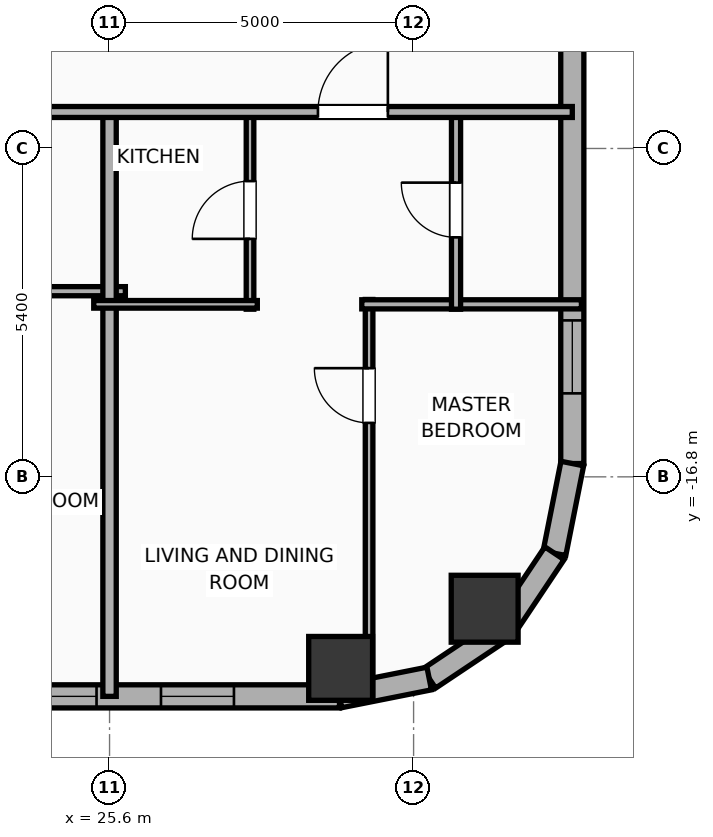
"""IFC4 building model, lengths in metres.
Left out: names, types, materials, properties, quantities, classifications, styles, units other than length and angle.
Written with IfcOpenShell. Run it as: python <this file> out.ifc"""

import sys

from ifc_helpers import new_model, si_unit, direction, frame, frame_2d, origin, origin_2d, place, context, subcontext, project, spatial, rectangle, hollow_rectangle, hollow_circle, extrude, element, fill, save


model = new_model("IFC4")
c1 = context("Model", 3, precision=1e-05, world=origin(), true_north=direction((0.0, 1.0)))
c2 = subcontext(c1, "Body", "Model", "MODEL_VIEW")
j1 = project(units=[si_unit("LENGTHUNIT", "METRE"), si_unit("PLANEANGLEUNIT", "RADIAN")], contexts=[c1])
p1 = place(None, origin())
s1 = spatial("IfcSite", under=j1, at=p1, CompositionType="ELEMENT")
p2 = place(p1, origin())
s2 = spatial("IfcBuilding", under=s1, at=p2, CompositionType="ELEMENT")
p3 = place(p2, frame((0.0, 0.0, 132.6)))
s3 = spatial("IfcBuildingStorey", under=s2, at=p3, CompositionType="ELEMENT", Elevation=132.6)
p4 = place(p3, frame((29.4, -19.95, 0.0), z_axis=(0.0, 0.0, 1.0), x_axis=(1.0, 0.0, 0.0)))
e1 = element("IfcColumn", 1, at=p4, inside=s3, PredefinedType="COLUMN", context=c2, shape_type="SweptSolid", body=[
    extrude(hollow_rectangle(XDim=1.05, YDim=1.05, WallThickness=0.036, at=origin_2d()), origin(), (0.0, 0.0, 1.0), 3.9),
])
p5 = place(p3, frame((31.769, -18.969, 0.0), z_axis=(0.0, 0.0, 1.0), x_axis=(1.0, 0.0, 0.0)))
e2 = element("IfcColumn", 2, at=p5, inside=s3, PredefinedType="COLUMN", context=c2, shape_type="SweptSolid", body=[
    extrude(hollow_circle(Radius=0.55, WallThickness=0.036, at=origin_2d()), origin(), (0.0, 0.0, 1.0), 3.9),
])
p6 = place(p3, frame((29.381, -20.41, 0.0), z_axis=(0.0, 0.0, 1.0), x_axis=(-1.0, 0.0, 0.0)))
e3 = element("IfcWall", 3, at=p6, inside=s3, PredefinedType="ELEMENTEDWALL", context=c2, shape_type="SweptSolid", body=[
    extrude(rectangle(XDim=54.763, YDim=0.38, at=frame_2d((27.381, 0.0))), origin(), (0.0, 0.0, 1.0), 3.65),
])
p7 = place(p6, frame((3.995, 0.0, 0.75)))
e4 = element("IfcOpeningElement", 4, at=p7, cuts=e3, PredefinedType="OPENING", context=c2, shape_type="SweptSolid", body=[
    extrude(rectangle(XDim=2.4, YDim=2.1, at=frame_2d((1.2, 1.05))), frame((0.0, 0.2, 0.0), z_axis=(0.0, -1.0, 0.0), x_axis=(1.0, 0.0, 0.0)), (0.0, 0.0, 1.0), 0.4),
])
p8 = place(p6, frame((18.486, 0.0, 0.75)))
e5 = element("IfcOpeningElement", 5, at=p8, cuts=e3, PredefinedType="OPENING", context=c2, shape_type="SweptSolid", body=[
    extrude(rectangle(XDim=2.4, YDim=2.1, at=frame_2d((1.2, 1.05))), frame((0.0, 0.2, 0.0), z_axis=(0.0, -1.0, 0.0), x_axis=(1.0, 0.0, 0.0)), (0.0, 0.0, 1.0), 0.4),
])
p9 = place(p6, frame((46.717, 0.0, 0.75)))
e6 = element("IfcOpeningElement", 6, at=p9, cuts=e3, PredefinedType="OPENING", context=c2, shape_type="SweptSolid", body=[
    extrude(rectangle(XDim=2.4, YDim=2.1, at=frame_2d((1.2, 1.05))), frame((0.0, 0.2, 0.0), z_axis=(0.0, -1.0, 0.0), x_axis=(1.0, 0.0, 0.0)), (0.0, 0.0, 1.0), 0.4),
])
p10 = place(p6, frame((52.651, 0.0, 0.75)))
e7 = element("IfcOpeningElement", 7, at=p10, cuts=e3, PredefinedType="OPENING", context=c2, shape_type="SweptSolid", body=[
    extrude(rectangle(XDim=1.2, YDim=2.05, at=frame_2d((0.6, 1.025))), frame((0.0, 0.2, 0.0), z_axis=(0.0, -1.0, 0.0), x_axis=(1.0, 0.0, 0.0)), (0.0, 0.0, 1.0), 0.4),
])
p11 = place(p6, frame((50.521, 0.0, 0.75)))
e8 = element("IfcOpeningElement", 8, at=p11, cuts=e3, PredefinedType="OPENING", context=c2, shape_type="SweptSolid", body=[
    extrude(rectangle(XDim=1.2, YDim=2.05, at=frame_2d((0.6, 1.025))), frame((0.0, 0.2, 0.0), z_axis=(0.0, -1.0, 0.0), x_axis=(1.0, 0.0, 0.0)), (0.0, 0.0, 1.0), 0.4),
])
p12 = place(p6, frame((40.191, 0.0, 0.75)))
e9 = element("IfcOpeningElement", 9, at=p12, cuts=e3, PredefinedType="OPENING", context=c2, shape_type="SweptSolid", body=[
    extrude(rectangle(XDim=1.2, YDim=2.05, at=frame_2d((0.6, 1.025))), frame((0.0, 0.2, 0.0), z_axis=(0.0, -1.0, 0.0), x_axis=(1.0, 0.0, 0.0)), (0.0, 0.0, 1.0), 0.4),
])
p13 = place(p6, frame((44.631, 0.0, 0.75)))
e10 = element("IfcOpeningElement", 10, at=p13, cuts=e3, PredefinedType="OPENING", context=c2, shape_type="SweptSolid", body=[
    extrude(rectangle(XDim=1.2, YDim=2.05, at=frame_2d((0.6, 1.025))), frame((0.0, 0.2, 0.0), z_axis=(0.0, -1.0, 0.0), x_axis=(1.0, 0.0, 0.0)), (0.0, 0.0, 1.0), 0.4),
])
p14 = place(p6, frame((36.561, 0.0, 0.75)))
e11 = element("IfcOpeningElement", 11, at=p14, cuts=e3, PredefinedType="OPENING", context=c2, shape_type="SweptSolid", body=[
    extrude(rectangle(XDim=1.2, YDim=2.05, at=frame_2d((0.6, 1.025))), frame((0.0, 0.2, 0.0), z_axis=(0.0, -1.0, 0.0), x_axis=(1.0, 0.0, 0.0)), (0.0, 0.0, 1.0), 0.4),
])
p15 = place(p6, frame((30.004, 0.0, 0.75)))
e12 = element("IfcOpeningElement", 12, at=p15, cuts=e3, PredefinedType="OPENING", context=c2, shape_type="SweptSolid", body=[
    extrude(rectangle(XDim=1.2, YDim=2.05, at=frame_2d((0.6, 1.025))), frame((0.0, 0.2, 0.0), z_axis=(0.0, -1.0, 0.0), x_axis=(1.0, 0.0, 0.0)), (0.0, 0.0, 1.0), 0.4),
])
p16 = place(p6, frame((33.599, 0.0, 0.75)))
e13 = element("IfcOpeningElement", 13, at=p16, cuts=e3, PredefinedType="OPENING", context=c2, shape_type="SweptSolid", body=[
    extrude(rectangle(XDim=1.2, YDim=2.05, at=frame_2d((0.6, 1.025))), frame((0.0, 0.2, 0.0), z_axis=(0.0, -1.0, 0.0), x_axis=(1.0, 0.0, 0.0)), (0.0, 0.0, 1.0), 0.4),
])
p17 = place(p6, frame((26.086, 0.0, 0.75)))
e14 = element("IfcOpeningElement", 14, at=p17, cuts=e3, PredefinedType="OPENING", context=c2, shape_type="SweptSolid", body=[
    extrude(rectangle(XDim=1.2, YDim=2.05, at=frame_2d((0.6, 1.025))), frame((0.0, 0.2, 0.0), z_axis=(0.0, -1.0, 0.0), x_axis=(1.0, 0.0, 0.0)), (0.0, 0.0, 1.0), 0.4),
])
p18 = place(p6, frame((22.626, 0.0, 0.75)))
e15 = element("IfcOpeningElement", 15, at=p18, cuts=e3, PredefinedType="OPENING", context=c2, shape_type="SweptSolid", body=[
    extrude(rectangle(XDim=1.2, YDim=2.05, at=frame_2d((0.6, 1.025))), frame((0.0, 0.2, 0.0), z_axis=(0.0, -1.0, 0.0), x_axis=(1.0, 0.0, 0.0)), (0.0, 0.0, 1.0), 0.4),
])
p19 = place(p6, frame((15.361, 0.0, 0.75)))
e16 = element("IfcOpeningElement", 16, at=p19, cuts=e3, PredefinedType="OPENING", context=c2, shape_type="SweptSolid", body=[
    extrude(rectangle(XDim=1.2, YDim=2.05, at=frame_2d((0.6, 1.025))), frame((0.0, 0.2, 0.0), z_axis=(0.0, -1.0, 0.0), x_axis=(1.0, 0.0, 0.0)), (0.0, 0.0, 1.0), 0.4),
])
p20 = place(p6, frame((8.986, 0.0, 0.75)))
e17 = element("IfcOpeningElement", 17, at=p20, cuts=e3, PredefinedType="OPENING", context=c2, shape_type="SweptSolid", body=[
    extrude(rectangle(XDim=1.2, YDim=2.05, at=frame_2d((0.6, 1.025))), frame((0.0, 0.2, 0.0), z_axis=(0.0, -1.0, 0.0), x_axis=(1.0, 0.0, 0.0)), (0.0, 0.0, 1.0), 0.4),
])
p21 = place(p6, frame((1.736, 0.0, 0.75)))
e18 = element("IfcOpeningElement", 18, at=p21, cuts=e3, PredefinedType="OPENING", context=c2, shape_type="SweptSolid", body=[
    extrude(rectangle(XDim=1.2, YDim=2.05, at=frame_2d((0.6, 1.025))), frame((0.0, 0.2, 0.0), z_axis=(0.0, -1.0, 0.0), x_axis=(1.0, 0.0, 0.0)), (0.0, 0.0, 1.0), 0.4),
])
p22 = place(p3, frame((33.21, 17.781, 0.0), z_axis=(0.0, 0.0, 1.0), x_axis=(0.0, -1.0, 0.0)))
e19 = element("IfcWall", 19, at=p22, inside=s3, PredefinedType="ELEMENTEDWALL", context=c2, shape_type="SweptSolid", body=[
    extrude(rectangle(XDim=34.363, YDim=0.38, at=frame_2d((17.181, 0.0))), origin(), (0.0, 0.0, 1.0), 3.65),
])
p23 = place(p22, frame((32.008, 0.0, 0.75)))
e20 = element("IfcOpeningElement", 20, at=p23, cuts=e19, PredefinedType="OPENING", context=c2, shape_type="SweptSolid", body=[
    extrude(rectangle(XDim=1.2, YDim=2.05, at=frame_2d((0.6, 1.025))), frame((0.0, 0.2, 0.0), z_axis=(0.0, -1.0, 0.0), x_axis=(1.0, 0.0, 0.0)), (0.0, 0.0, 1.0), 0.4),
])
p24 = place(p22, frame((12.486, 0.0, 0.75)))
e21 = element("IfcOpeningElement", 21, at=p24, cuts=e19, PredefinedType="OPENING", context=c2, shape_type="SweptSolid", body=[
    extrude(rectangle(XDim=1.2, YDim=2.05, at=frame_2d((0.6, 1.025))), frame((0.0, 0.2, 0.0), z_axis=(0.0, -1.0, 0.0), x_axis=(1.0, 0.0, 0.0)), (0.0, 0.0, 1.0), 0.4),
])
p25 = place(p22, frame((21.736, 0.0, 0.75)))
e22 = element("IfcOpeningElement", 22, at=p25, cuts=e19, PredefinedType="OPENING", context=c2, shape_type="SweptSolid", body=[
    extrude(rectangle(XDim=1.2, YDim=2.05, at=frame_2d((0.6, 1.025))), frame((0.0, 0.2, 0.0), z_axis=(0.0, -1.0, 0.0), x_axis=(1.0, 0.0, 0.0)), (0.0, 0.0, 1.0), 0.4),
])
p26 = place(p3, frame((33.21, -16.581, 0.0), z_axis=(0.0, 0.0, 1.0), x_axis=(-0.195086038585, -0.980786132421, 0.0)))
e23 = element("IfcWall", 23, at=p26, inside=s3, PredefinedType="ELEMENTEDWALL", context=c2, shape_type="SweptSolid", body=[
    extrude(rectangle(XDim=1.504, YDim=0.38, at=frame_2d((0.752, 0.0))), origin(), (0.0, 0.0, 1.0), 3.65),
])
p27 = place(p3, frame((32.917, -18.057, 0.0), z_axis=(0.0, 0.0, 1.0), x_axis=(-0.555610286119, -0.831442848281, 0.0)))
e24 = element("IfcWall", 24, at=p27, inside=s3, PredefinedType="ELEMENTEDWALL", context=c2, shape_type="SweptSolid", body=[
    extrude(rectangle(XDim=1.485, YDim=0.38, at=frame_2d((0.743, 0.0))), origin(), (0.0, 0.0, 1.0), 3.65),
])
p28 = place(p3, frame((32.091, -19.292, 0.0), z_axis=(0.0, 0.0, 1.0), x_axis=(-0.831468045563, -0.555572577804, 0.0)))
e25 = element("IfcWall", 25, at=p28, inside=s3, PredefinedType="ELEMENTEDWALL", context=c2, shape_type="SweptSolid", body=[
    extrude(rectangle(XDim=1.485, YDim=0.38, at=frame_2d((0.742, 0.0))), origin(), (0.0, 0.0, 1.0), 3.65),
])
p29 = place(p3, frame((30.857, -20.116, 0.0), z_axis=(0.0, 0.0, 1.0), x_axis=(-0.980786132421, -0.195086038585, 0.0)))
e26 = element("IfcWall", 26, at=p29, inside=s3, PredefinedType="ELEMENTEDWALL", context=c2, shape_type="SweptSolid", body=[
    extrude(rectangle(XDim=1.504, YDim=0.38, at=frame_2d((0.752, 0.0))), origin(), (0.0, 0.0, 1.0), 3.65),
])
p30 = place(p3, frame((22.07, -13.747, 0.0), z_axis=(0.0, 0.0, 1.0), x_axis=(1.0, 0.0, 0.0)))
e27 = element("IfcWall", 27, at=p30, inside=s3, PredefinedType="PLUMBINGWALL", context=c2, shape_type="SweptSolid", body=[
    extrude(rectangle(XDim=3.79, YDim=0.15, at=frame_2d((1.895, 0.0))), origin(), (0.0, 0.0, 1.0), 3.65),
])
p31 = place(p3, frame((25.6, -20.41, 0.0), z_axis=(0.0, 0.0, 1.0), x_axis=(0.0, 1.0, 0.0)))
e28 = element("IfcWall", 28, at=p31, inside=s3, PredefinedType="PARTITIONING", context=c2, shape_type="SweptSolid", body=[
    extrude(rectangle(XDim=9.69, YDim=0.22, at=frame_2d((4.845, 0.0))), origin(), (0.0, 0.0, 1.0), 3.65),
])
p32 = place(p3, frame((29.868, -20.466, 0.0), z_axis=(0.0, 0.0, 1.0), x_axis=(0.0, 1.0, 0.0)))
e29 = element("IfcWall", 29, at=p32, inside=s3, PredefinedType="PARTITIONING", context=c2, shape_type="SweptSolid", body=[
    extrude(rectangle(XDim=6.583, YDim=0.125, at=frame_2d((3.292, 0.0))), origin(), (0.0, 0.0, 1.0), 3.65),
])
p33 = place(p32, frame((4.553, 0.0, 0.0)))
e30 = element("IfcOpeningElement", 30, at=p33, cuts=e29, PredefinedType="OPENING", context=c2, shape_type="SweptSolid", body=[
    extrude(rectangle(XDim=0.9, YDim=2.05, at=frame_2d((0.45, 1.025))), frame((0.0, 0.073, 0.0), z_axis=(0.0, -1.0, 0.0), x_axis=(1.0, 0.0, 0.0)), (0.0, 0.0, 1.0), 0.145),
])
p34 = place(p3, frame((29.748, -13.963, 0.0), z_axis=(0.0, 0.0, 1.0), x_axis=(1.0, 0.0, 0.0)))
e31 = element("IfcWall", 31, at=p34, inside=s3, PredefinedType="PLUMBINGWALL", context=c2, shape_type="SweptSolid", body=[
    extrude(rectangle(XDim=3.612, YDim=0.15, at=frame_2d((1.806, 0.0))), origin(), (0.0, 0.0, 1.0), 3.65),
])
p35 = place(p3, frame((27.91, -14.043, 0.0), z_axis=(0.0, 0.0, 1.0), x_axis=(0.0, 1.0, 0.0)))
e32 = element("IfcWall", 32, at=p35, inside=s3, PredefinedType="PARTITIONING", context=c2, shape_type="SweptSolid", body=[
    extrude(rectangle(XDim=3.263, YDim=0.125, at=frame_2d((1.631, 0.0))), origin(), (0.0, 0.0, 1.0), 3.65),
])
p36 = place(p35, frame((1.156, 0.0, 0.0)))
e33 = element("IfcOpeningElement", 33, at=p36, cuts=e32, PredefinedType="OPENING", context=c2, shape_type="SweptSolid", body=[
    extrude(rectangle(XDim=0.95, YDim=2.05, at=frame_2d((0.475, 1.025))), frame((0.0, 0.073, 0.0), z_axis=(0.0, -1.0, 0.0), x_axis=(1.0, 0.0, 0.0)), (0.0, 0.0, 1.0), 0.145),
])
p37 = place(p3, frame((25.34, -13.963, 0.0), z_axis=(0.0, 0.0, 1.0), x_axis=(1.0, 0.0, 0.0)))
e34 = element("IfcWall", 34, at=p37, inside=s3, PredefinedType="PARTITIONING", context=c2, shape_type="SweptSolid", body=[
    extrude(rectangle(XDim=2.69, YDim=0.125, at=frame_2d((1.345, 0.0))), origin(), (0.0, 0.0, 1.0), 3.65),
])
p38 = place(p3, frame((31.298, -14.043, 0.0), z_axis=(0.0, 0.0, 1.0), x_axis=(0.0, 1.0, 0.0)))
e35 = element("IfcWall", 35, at=p38, inside=s3, PredefinedType="PLUMBINGWALL", context=c2, shape_type="SweptSolid", body=[
    extrude(rectangle(XDim=3.263, YDim=0.15, at=frame_2d((1.631, 0.0))), origin(), (0.0, 0.0, 1.0), 3.65),
])
p39 = place(p38, frame((1.181, 0.0, 0.0)))
e36 = element("IfcOpeningElement", 36, at=p39, cuts=e35, PredefinedType="OPENING", context=c2, shape_type="SweptSolid", body=[
    extrude(rectangle(XDim=0.9, YDim=2.05, at=frame_2d((0.45, 1.025))), frame((0.0, 0.085, 0.0), z_axis=(0.0, -1.0, 0.0), x_axis=(1.0, 0.0, 0.0)), (0.0, 0.0, 1.0), 0.17),
])
p40 = place(p3, frame((-29.21, -10.8, 0.0), z_axis=(0.0, 0.0, 1.0), x_axis=(1.0, 0.0, 0.0)))
e37 = element("IfcWall", 37, at=p40, inside=s3, PredefinedType="PARTITIONING", context=c2, shape_type="SweptSolid", body=[
    extrude(rectangle(XDim=62.42, YDim=0.18, at=frame_2d((31.21, 0.0))), origin(), (0.0, 0.0, 1.0), 3.65),
])
p41 = place(p40, frame((2.74, 0.0, 0.0)))
e38 = element("IfcOpeningElement", 38, at=p41, cuts=e37, PredefinedType="OPENING", context=c2, shape_type="SweptSolid", body=[
    extrude(rectangle(XDim=0.9, YDim=2.05, at=frame_2d((0.45, 1.025))), frame((0.0, 0.1, 0.0), z_axis=(0.0, -1.0, 0.0), x_axis=(1.0, 0.0, 0.0)), (0.0, 0.0, 1.0), 0.2),
])
p42 = place(p40, frame((9.968, 0.0, 0.0)))
e39 = element("IfcOpeningElement", 39, at=p42, cuts=e37, PredefinedType="OPENING", context=c2, shape_type="SweptSolid", body=[
    extrude(rectangle(XDim=1.15, YDim=2.05, at=frame_2d((0.575, 1.025))), frame((0.0, 0.1, 0.0), z_axis=(0.0, -1.0, 0.0), x_axis=(1.0, 0.0, 0.0)), (0.0, 0.0, 1.0), 0.2),
])
p43 = place(p40, frame((17.227, 0.0, 0.0)))
e40 = element("IfcOpeningElement", 40, at=p43, cuts=e37, PredefinedType="OPENING", context=c2, shape_type="SweptSolid", body=[
    extrude(rectangle(XDim=1.15, YDim=2.05, at=frame_2d((0.575, 1.025))), frame((0.0, 0.1, 0.0), z_axis=(0.0, -1.0, 0.0), x_axis=(1.0, 0.0, 0.0)), (0.0, 0.0, 1.0), 0.2),
])
p44 = place(p40, frame((28.157, 0.0, 0.0)))
e41 = element("IfcOpeningElement", 41, at=p44, cuts=e37, PredefinedType="OPENING", context=c2, shape_type="SweptSolid", body=[
    extrude(rectangle(XDim=1.15, YDim=2.05, at=frame_2d((0.575, 1.025))), frame((0.0, 0.1, 0.0), z_axis=(0.0, -1.0, 0.0), x_axis=(1.0, 0.0, 0.0)), (0.0, 0.0, 1.0), 0.2),
])
p45 = place(p40, frame((38.512, 0.0, 0.0)))
e42 = element("IfcOpeningElement", 42, at=p45, cuts=e37, PredefinedType="OPENING", context=c2, shape_type="SweptSolid", body=[
    extrude(rectangle(XDim=1.15, YDim=2.05, at=frame_2d((0.575, 1.025))), frame((0.0, 0.1, 0.0), z_axis=(0.0, -1.0, 0.0), x_axis=(1.0, 0.0, 0.0)), (0.0, 0.0, 1.0), 0.2),
])
p46 = place(p40, frame((49.33, 0.0, 0.0)))
e43 = element("IfcOpeningElement", 43, at=p46, cuts=e37, PredefinedType="OPENING", context=c2, shape_type="SweptSolid", body=[
    extrude(rectangle(XDim=1.15, YDim=2.05, at=frame_2d((0.575, 1.025))), frame((0.0, 0.1, 0.0), z_axis=(0.0, -1.0, 0.0), x_axis=(1.0, 0.0, 0.0)), (0.0, 0.0, 1.0), 0.2),
])
p47 = place(p40, frame((58.237, 0.0, 0.0)))
e44 = element("IfcOpeningElement", 44, at=p47, cuts=e37, PredefinedType="OPENING", context=c2, shape_type="SweptSolid", body=[
    extrude(rectangle(XDim=1.15, YDim=2.05, at=frame_2d((0.575, 1.025))), frame((0.0, 0.1, 0.0), z_axis=(0.0, -1.0, 0.0), x_axis=(1.0, 0.0, 0.0)), (0.0, 0.0, 1.0), 0.2),
])
p48 = place(p7, origin())
e45 = element("IfcWindow", 45, at=p48, inside=s3, PartitioningType="SINGLE_PANEL", PredefinedType="WINDOW", context=c2, shape_type="SweptSolid", body=[
    extrude(rectangle(XDim=2.4, YDim=2.1, at=frame_2d((1.2, 1.05))), frame((0.0, 0.03, 0.0), z_axis=(0.0, -1.0, 0.0), x_axis=(1.0, 0.0, 0.0)), (0.0, 0.0, 1.0), 0.06),
])
fill(e4, e45)
p49 = place(p21, origin())
e46 = element("IfcWindow", 46, at=p49, inside=s3, PartitioningType="SINGLE_PANEL", PredefinedType="WINDOW", context=c2, shape_type="SweptSolid", body=[
    extrude(rectangle(XDim=1.2, YDim=2.05, at=frame_2d((0.6, 1.025))), frame((0.0, 0.03, 0.0), z_axis=(0.0, -1.0, 0.0), x_axis=(1.0, 0.0, 0.0)), (0.0, 0.0, 1.0), 0.06),
])
fill(e18, e46)
p50 = place(p23, origin())
e47 = element("IfcWindow", 47, at=p50, inside=s3, PartitioningType="SINGLE_PANEL", PredefinedType="WINDOW", context=c2, shape_type="SweptSolid", body=[
    extrude(rectangle(XDim=1.2, YDim=2.05, at=frame_2d((0.6, 1.025))), frame((0.0, 0.03, 0.0), z_axis=(0.0, -1.0, 0.0), x_axis=(1.0, 0.0, 0.0)), (0.0, 0.0, 1.0), 0.06),
])
fill(e20, e47)
p51 = place(p33, origin())
e48 = element("IfcDoor", 48, at=p51, inside=s3, OperationType="SINGLE_SWING_RIGHT", PredefinedType="DOOR", context=c2, shape_type="SweptSolid", body=[
    extrude(rectangle(XDim=0.9, YDim=2.05, at=frame_2d((0.45, 1.025))), frame((0.0, 0.025, 0.0), z_axis=(0.0, -1.0, 0.0), x_axis=(1.0, 0.0, 0.0)), (0.0, 0.0, 1.0), 0.05),
])
fill(e30, e48)
p52 = place(p36, origin())
e49 = element("IfcDoor", 49, at=p52, inside=s3, OperationType="SINGLE_SWING_LEFT", PredefinedType="DOOR", context=c2, shape_type="SweptSolid", body=[
    extrude(rectangle(XDim=0.95, YDim=2.05, at=frame_2d((0.475, 1.025))), frame((0.0, 0.025, 0.0), z_axis=(0.0, -1.0, 0.0), x_axis=(1.0, 0.0, 0.0)), (0.0, 0.0, 1.0), 0.05),
])
fill(e33, e49)
p53 = place(p39, origin())
e50 = element("IfcDoor", 50, at=p53, inside=s3, OperationType="SINGLE_SWING_RIGHT", PredefinedType="DOOR", context=c2, shape_type="SweptSolid", body=[
    extrude(rectangle(XDim=0.9, YDim=2.05, at=frame_2d((0.45, 1.025))), frame((0.0, 0.025, 0.0), z_axis=(0.0, -1.0, 0.0), x_axis=(1.0, 0.0, 0.0)), (0.0, 0.0, 1.0), 0.05),
])
fill(e36, e50)
p54 = place(p47, origin())
e51 = element("IfcDoor", 51, at=p54, inside=s3, OperationType="SINGLE_SWING_RIGHT", PredefinedType="DOOR", context=c2, shape_type="SweptSolid", body=[
    extrude(rectangle(XDim=1.15, YDim=2.05, at=frame_2d((0.575, 1.025))), frame((0.0, 0.025, 0.0), z_axis=(0.0, -1.0, 0.0), x_axis=(1.0, 0.0, 0.0)), (0.0, 0.0, 1.0), 0.05),
])
fill(e44, e51)
save(model, sys.argv[1])
